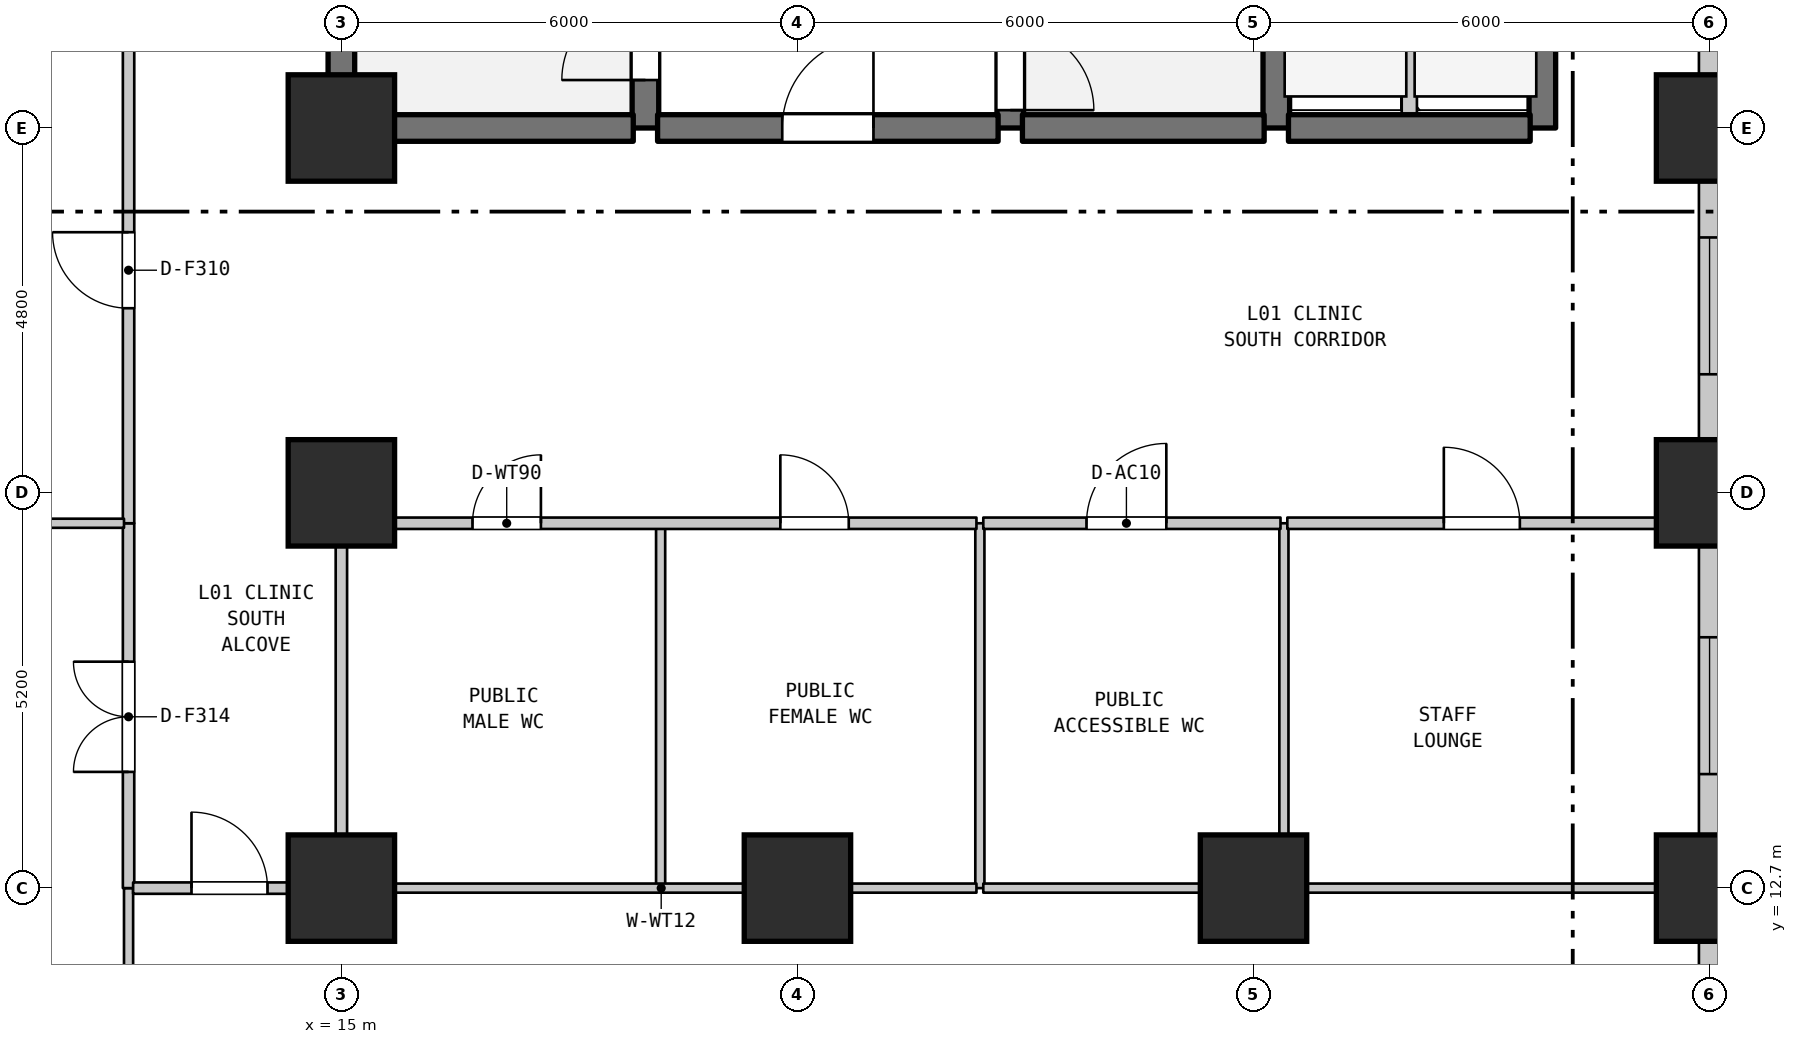
"""IFC4 building model, lengths in metres.
Left out: names, types, materials, properties, quantities, classifications, styles, units other than length and angle.
Written with IfcOpenShell. Run it as: python <this file> out.ifc"""

import sys

from ifc_helpers import new_model, si_unit, direction, frame, frame_2d, origin, origin_2d, place, context, subcontext, project, spatial, rectangle, extrude, element, fill, save


model = new_model("IFC4")
c1 = context("Model", 3, precision=1e-05, world=origin(), true_north=direction((0.0, 1.0)))
c2 = subcontext(c1, "Body", "Model", "MODEL_VIEW")
j1 = project(units=[si_unit("LENGTHUNIT", "METRE"), si_unit("PLANEANGLEUNIT", "RADIAN")], contexts=[c1])
p1 = place(None, origin())
s1 = spatial("IfcSite", under=j1, at=p1, CompositionType="ELEMENT")
p2 = place(p1, origin())
s2 = spatial("IfcBuilding", under=s1, at=p2, CompositionType="ELEMENT")
p3 = place(p2, frame((0.0, 0.0, 6.5)))
s3 = spatial("IfcBuildingStorey", under=s2, at=p3, CompositionType="ELEMENT", Elevation=6.5)
for number, where, z_axis, x_axis in (
    (1, (15.0, 12.7, 0.0), (0.0, 0.0, 1.0), (1.0, 0.0, 0.0)),
    (2, (15.0, 17.9, 0.0), (0.0, 0.0, 1.0), (1.0, 0.0, 0.0)),
    (3, (15.0, 22.7, 0.0), (0.0, 0.0, 1.0), (1.0, 0.0, 0.0)),
    (4, (21.0, 12.7, 0.0), (0.0, 0.0, 1.0), (1.0, 0.0, 0.0)),
    (5, (27.0, 12.7, 0.0), (0.0, 0.0, 1.0), (1.0, 0.0, 0.0)),
):
    element("IfcColumn", number, at=place(p3, frame(where, z_axis=z_axis, x_axis=x_axis)), inside=s3, PredefinedType="COLUMN", context=c2, shape_type="SweptSolid", body=[
        extrude(rectangle(XDim=1.4, YDim=1.4, at=origin_2d()), origin(), (0.0, 0.0, 1.0), 6.5),
    ])
for number, where, z_axis, x_axis in (
    (6, (33.0, 12.7, 0.0), (0.0, 0.0, 1.0), (1.0, 0.0, 0.0)),
    (7, (33.0, 17.9, 0.0), (0.0, 0.0, 1.0), (1.0, 0.0, 0.0)),
    (8, (33.0, 22.7, 0.0), (0.0, 0.0, 1.0), (1.0, 0.0, 0.0)),
):
    element("IfcColumn", number, at=place(p3, frame(where, z_axis=z_axis, x_axis=x_axis)), inside=s3, PredefinedType="PILASTER", context=c2, shape_type="SweptSolid", body=[
        extrude(rectangle(XDim=1.4, YDim=1.4, at=origin_2d()), origin(), (0.0, 0.0, 1.0), 6.5),
    ])
p4 = place(p3, frame((12.2, 0.71, 0.0), z_axis=(0.0, 0.0, 1.0), x_axis=(0.0, 1.0, 0.0)))
e9 = element("IfcWall", 9, at=p4, inside=s3, PredefinedType="PARTITIONING", context=c2, shape_type="SweptSolid", body=[
    extrude(rectangle(XDim=11.99, YDim=0.12, at=frame_2d((5.995, 0.0))), origin(), (0.0, 0.0, 1.0), 6.17),
])
p5 = place(p3, frame((12.2, 12.7, 0.0), z_axis=(0.0, 0.0, 1.0), x_axis=(0.0, 1.0, 0.0)))
e10 = element("IfcWall", 10, at=p5, inside=s3, PredefinedType="STANDARD", context=c2, shape_type="SweptSolid", body=[
    extrude(rectangle(XDim=4.8, YDim=0.15, at=frame_2d((2.4, 0.0))), origin(), (0.0, 0.0, 1.0), 6.17),
])
p6 = place(p5, frame((1.529, 0.0, 0.0)))
e11 = element("IfcOpeningElement", 11, at=p6, cuts=e10, PredefinedType="OPENING", context=c2, shape_type="SweptSolid", body=[
    extrude(rectangle(XDim=1.45, YDim=2.2, at=frame_2d((0.725, 1.1))), frame((0.0, 0.085, 0.0), z_axis=(0.0, -1.0, 0.0), x_axis=(1.0, 0.0, 0.0)), (0.0, 0.0, 1.0), 0.17),
])
p7 = place(p3, frame((12.2, 17.5, 0.0), z_axis=(0.0, 0.0, 1.0), x_axis=(0.0, 1.0, 0.0)))
e12 = element("IfcWall", 12, at=p7, inside=s3, PredefinedType="STANDARD", context=c2, shape_type="SweptSolid", body=[
    extrude(rectangle(XDim=6.7, YDim=0.15, at=frame_2d((3.35, 0.0))), origin(), (0.0, 0.0, 1.0), 6.17),
])
p8 = place(p7, frame((2.829, 0.0, 0.0)))
e13 = element("IfcOpeningElement", 13, at=p8, cuts=e12, PredefinedType="OPENING", context=c2, shape_type="SweptSolid", body=[
    extrude(rectangle(XDim=1.0, YDim=2.15, at=frame_2d((0.5, 1.075))), frame((0.0, 0.085, 0.0), z_axis=(0.0, -1.0, 0.0), x_axis=(1.0, 0.0, 0.0)), (0.0, 0.0, 1.0), 0.17),
])
p9 = place(p3, frame((15.0, 12.7, 0.0), z_axis=(0.0, 0.0, 1.0), x_axis=(0.0, 1.0, 0.0)))
e14 = element("IfcWall", 14, at=p9, inside=s3, PredefinedType="STANDARD", context=c2, shape_type="SweptSolid", body=[
    extrude(rectangle(XDim=4.8, YDim=0.15, at=frame_2d((2.4, 0.0))), origin(), (0.0, 0.0, 1.0), 5.67),
])
p10 = place(p3, frame((15.0, 22.7, 0.0), z_axis=(0.0, 0.0, 1.0), x_axis=(0.0, 1.0, 0.0)))
e15 = element("IfcWall", 15, at=p10, inside=s3, PredefinedType="SHEAR", context=c2, shape_type="SweptSolid", body=[
    extrude(rectangle(XDim=6.8, YDim=0.35, at=frame_2d((3.4, 0.0))), origin(), (0.0, 0.0, 1.0), 6.17),
])
p11 = place(p3, frame((19.0, 22.7, 0.0), z_axis=(0.0, 0.0, 1.0), x_axis=(0.0, 1.0, 0.0)))
e16 = element("IfcWall", 16, at=p11, inside=s3, PredefinedType="SHEAR", context=c2, shape_type="SweptSolid", body=[
    extrude(rectangle(XDim=5.5, YDim=0.35, at=frame_2d((2.75, 0.0))), origin(), (0.0, 0.0, 1.0), 6.17),
])
p12 = place(p11, frame((0.631, 0.0, 0.0)))
e17 = element("IfcOpeningElement", 17, at=p12, cuts=e16, PredefinedType="OPENING", context=c2, shape_type="SweptSolid", body=[
    extrude(rectangle(XDim=1.1, YDim=2.15, at=frame_2d((0.55, 1.075))), frame((0.0, 0.185, 0.0), z_axis=(0.0, -1.0, 0.0), x_axis=(1.0, 0.0, 0.0)), (0.0, 0.0, 1.0), 0.37),
])
for number, where, z_axis, x_axis in (
    (18, (19.2, 12.7, 0.0), (0.0, 0.0, 1.0), (0.0, 1.0, 0.0)),
    (19, (23.4, 12.7, 0.0), (0.0, 0.0, 1.0), (0.0, 1.0, 0.0)),
):
    element("IfcWall", number, at=place(p3, frame(where, z_axis=z_axis, x_axis=x_axis)), inside=s3, PredefinedType="PARTITIONING", context=c2, shape_type="SweptSolid", body=[
        extrude(rectangle(XDim=4.8, YDim=0.12, at=frame_2d((2.4, 0.0))), origin(), (0.0, 0.0, 1.0), 6.17),
    ])
p13 = place(p3, frame((23.8, 22.7, 0.0), z_axis=(0.0, 0.0, 1.0), x_axis=(0.0, 1.0, 0.0)))
e20 = element("IfcWall", 20, at=p13, inside=s3, PredefinedType="SHEAR", context=c2, shape_type="SweptSolid", body=[
    extrude(rectangle(XDim=5.5, YDim=0.35, at=frame_2d((2.75, 0.0))), origin(), (0.0, 0.0, 1.0), 6.17),
])
p14 = place(p13, frame((0.235, 0.0, 0.0)))
e21 = element("IfcOpeningElement", 21, at=p14, cuts=e20, PredefinedType="OPENING", context=c2, shape_type="SweptSolid", body=[
    extrude(rectangle(XDim=1.1, YDim=2.15, at=frame_2d((0.55, 1.075))), frame((0.0, 0.185, 0.0), z_axis=(0.0, -1.0, 0.0), x_axis=(1.0, 0.0, 0.0)), (0.0, 0.0, 1.0), 0.37),
])
p15 = place(p3, frame((27.3, 22.7, 0.0), z_axis=(0.0, 0.0, 1.0), x_axis=(0.0, 1.0, 0.0)))
e22 = element("IfcWall", 22, at=p15, inside=s3, PredefinedType="SHEAR", context=c2, shape_type="SweptSolid", body=[
    extrude(rectangle(XDim=2.9, YDim=0.35, at=frame_2d((1.45, 0.0))), origin(), (0.0, 0.0, 1.0), 6.17),
])
p16 = place(p3, frame((27.4, 12.7, 0.0), z_axis=(0.0, 0.0, 1.0), x_axis=(0.0, 1.0, 0.0)))
e23 = element("IfcWall", 23, at=p16, inside=s3, PredefinedType="PARTITIONING", context=c2, shape_type="SweptSolid", body=[
    extrude(rectangle(XDim=4.8, YDim=0.12, at=frame_2d((2.4, 0.0))), origin(), (0.0, 0.0, 1.0), 6.17),
])
p17 = place(p3, frame((29.05, 22.7, 0.0), z_axis=(0.0, 0.0, 1.0), x_axis=(0.0, 1.0, 0.0)))
e24 = element("IfcWall", 24, at=p17, inside=s3, PredefinedType="STANDARD", context=c2, shape_type="SweptSolid", body=[
    extrude(rectangle(XDim=2.9, YDim=0.2, at=frame_2d((1.45, 0.0))), origin(), (0.0, 0.0, 1.0), 6.17),
])
p18 = place(p3, frame((30.8, 22.7, 0.0), z_axis=(0.0, 0.0, 1.0), x_axis=(0.0, 1.0, 0.0)))
e25 = element("IfcWall", 25, at=p18, inside=s3, PredefinedType="SHEAR", context=c2, shape_type="SweptSolid", body=[
    extrude(rectangle(XDim=2.9, YDim=0.35, at=frame_2d((1.45, 0.0))), origin(), (0.0, 0.0, 1.0), 6.17),
])
p19 = place(p3, frame((12.26, 12.7, 0.0), z_axis=(0.0, 0.0, 1.0), x_axis=(1.0, 0.0, 0.0)))
e26 = element("IfcWall", 26, at=p19, inside=s3, PredefinedType="STANDARD", context=c2, shape_type="SweptSolid", body=[
    extrude(rectangle(XDim=2.68, YDim=0.15, at=frame_2d((1.34, 0.0))), origin(), (0.0, 0.0, 1.0), 6.17),
])
p20 = place(p19, frame((0.768, 0.0, 0.0)))
e27 = element("IfcOpeningElement", 27, at=p20, cuts=e26, PredefinedType="OPENING", context=c2, shape_type="SweptSolid", body=[
    extrude(rectangle(XDim=1.0, YDim=2.15, at=frame_2d((0.5, 1.075))), frame((0.0, 0.085, 0.0), z_axis=(0.0, -1.0, 0.0), x_axis=(1.0, 0.0, 0.0)), (0.0, 0.0, 1.0), 0.17),
])
p21 = place(p3, frame((15.06, 12.7, 0.0), z_axis=(0.0, 0.0, 1.0), x_axis=(1.0, 0.0, 0.0)))
e28 = element("IfcWall", 28, at=p21, inside=s3, PredefinedType="PARTITIONING", context=c2, shape_type="SweptSolid", body=[
    extrude(rectangle(XDim=8.295, YDim=0.12, at=frame_2d((4.147, 0.0))), origin(), (0.0, 0.0, 1.0), 6.17),
])
p22 = place(p3, frame((23.445, 12.7, 0.0), z_axis=(0.0, 0.0, 1.0), x_axis=(1.0, 0.0, 0.0)))
e29 = element("IfcWall", 29, at=p22, inside=s3, PredefinedType="PARTITIONING", context=c2, shape_type="SweptSolid", body=[
    extrude(rectangle(XDim=3.91, YDim=0.12, at=frame_2d((1.955, 0.0))), origin(), (0.0, 0.0, 1.0), 6.17),
])
p23 = place(p3, frame((27.445, 12.7, 0.0), z_axis=(0.0, 0.0, 1.0), x_axis=(1.0, 0.0, 0.0)))
e30 = element("IfcWall", 30, at=p23, inside=s3, PredefinedType="PARTITIONING", context=c2, shape_type="SweptSolid", body=[
    extrude(rectangle(XDim=5.545, YDim=0.12, at=frame_2d((2.772, 0.0))), origin(), (0.0, 0.0, 1.0), 6.17),
])
p24 = place(p3, frame((3.69, 17.5, 0.0), z_axis=(0.0, 0.0, 1.0), x_axis=(1.0, 0.0, 0.0)))
e31 = element("IfcWall", 31, at=p24, inside=s3, PredefinedType="PARTITIONING", context=c2, shape_type="SweptSolid", body=[
    extrude(rectangle(XDim=8.45, YDim=0.12, at=frame_2d((4.225, 0.0))), origin(), (0.0, 0.0, 1.0), 6.17),
])
p25 = place(p3, frame((15.06, 17.5, 0.0), z_axis=(0.0, 0.0, 1.0), x_axis=(1.0, 0.0, 0.0)))
e32 = element("IfcWall", 32, at=p25, inside=s3, PredefinedType="STANDARD", context=c2, shape_type="SweptSolid", body=[
    extrude(rectangle(XDim=8.295, YDim=0.15, at=frame_2d((4.147, 0.0))), origin(), (0.0, 0.0, 1.0), 6.17),
])
p26 = place(p25, frame((1.665, 0.0, 0.0)))
e33 = element("IfcOpeningElement", 33, at=p26, cuts=e32, PredefinedType="OPENING", context=c2, shape_type="SweptSolid", body=[
    extrude(rectangle(XDim=0.9, YDim=2.1, at=frame_2d((0.45, 1.05))), frame((0.0, 0.085, 0.0), z_axis=(0.0, -1.0, 0.0), x_axis=(1.0, 0.0, 0.0)), (0.0, 0.0, 1.0), 0.17),
])
p27 = place(p25, frame((5.715, 0.0, 0.0)))
e34 = element("IfcOpeningElement", 34, at=p27, cuts=e32, PredefinedType="OPENING", context=c2, shape_type="SweptSolid", body=[
    extrude(rectangle(XDim=0.9, YDim=2.1, at=frame_2d((0.45, 1.05))), frame((0.0, 0.085, 0.0), z_axis=(0.0, -1.0, 0.0), x_axis=(1.0, 0.0, 0.0)), (0.0, 0.0, 1.0), 0.17),
])
p28 = place(p3, frame((23.445, 17.5, 0.0), z_axis=(0.0, 0.0, 1.0), x_axis=(1.0, 0.0, 0.0)))
e35 = element("IfcWall", 35, at=p28, inside=s3, PredefinedType="STANDARD", context=c2, shape_type="SweptSolid", body=[
    extrude(rectangle(XDim=3.91, YDim=0.15, at=frame_2d((1.955, 0.0))), origin(), (0.0, 0.0, 1.0), 6.17),
])
p29 = place(p28, frame((1.358, 0.0, 0.0)))
e36 = element("IfcOpeningElement", 36, at=p29, cuts=e35, PredefinedType="OPENING", context=c2, shape_type="SweptSolid", body=[
    extrude(rectangle(XDim=1.05, YDim=2.15, at=frame_2d((0.525, 1.075))), frame((0.0, 0.085, 0.0), z_axis=(0.0, -1.0, 0.0), x_axis=(1.0, 0.0, 0.0)), (0.0, 0.0, 1.0), 0.17),
])
p30 = place(p3, frame((27.445, 17.5, 0.0), z_axis=(0.0, 0.0, 1.0), x_axis=(1.0, 0.0, 0.0)))
e37 = element("IfcWall", 37, at=p30, inside=s3, PredefinedType="STANDARD", context=c2, shape_type="SweptSolid", body=[
    extrude(rectangle(XDim=5.545, YDim=0.15, at=frame_2d((2.772, 0.0))), origin(), (0.0, 0.0, 1.0), 6.17),
])
p31 = place(p30, frame((2.059, 0.0, 0.0)))
e38 = element("IfcOpeningElement", 38, at=p31, cuts=e37, PredefinedType="OPENING", context=c2, shape_type="SweptSolid", body=[
    extrude(rectangle(XDim=1.0, YDim=2.15, at=frame_2d((0.5, 1.075))), frame((0.0, 0.085, 0.0), z_axis=(0.0, -1.0, 0.0), x_axis=(1.0, 0.0, 0.0)), (0.0, 0.0, 1.0), 0.17),
])
p32 = place(p3, frame((15.16, 22.7, 0.0), z_axis=(0.0, 0.0, 1.0), x_axis=(1.0, 0.0, 0.0)))
e39 = element("IfcWall", 39, at=p32, inside=s3, PredefinedType="SHEAR", context=c2, shape_type="SweptSolid", body=[
    extrude(rectangle(XDim=3.68, YDim=0.35, at=frame_2d((1.84, 0.0))), origin(), (0.0, 0.0, 1.0), 6.17),
])
p33 = place(p3, frame((19.16, 22.7, 0.0), z_axis=(0.0, 0.0, 1.0), x_axis=(1.0, 0.0, 0.0)))
e40 = element("IfcWall", 40, at=p33, inside=s3, PredefinedType="SHEAR", context=c2, shape_type="SweptSolid", body=[
    extrude(rectangle(XDim=4.48, YDim=0.35, at=frame_2d((2.24, 0.0))), origin(), (0.0, 0.0, 1.0), 6.17),
])
p34 = place(p33, frame((1.64, 0.0, 0.0)))
e41 = element("IfcOpeningElement", 41, at=p34, cuts=e40, PredefinedType="OPENING", context=c2, shape_type="SweptSolid", body=[
    extrude(rectangle(XDim=1.2, YDim=2.2, at=frame_2d((0.6, 1.1))), frame((0.0, 0.185, 0.0), z_axis=(0.0, -1.0, 0.0), x_axis=(1.0, 0.0, 0.0)), (0.0, 0.0, 1.0), 0.37),
])
for number, where, z_axis, x_axis in (
    (42, (23.96, 22.7, 0.0), (0.0, 0.0, 1.0), (1.0, 0.0, 0.0)),
    (43, (27.46, 22.7, 0.0), (0.0, 0.0, 1.0), (1.0, 0.0, 0.0)),
):
    element("IfcWall", number, at=place(p3, frame(where, z_axis=z_axis, x_axis=x_axis)), inside=s3, PredefinedType="SHEAR", context=c2, shape_type="SweptSolid", body=[
        extrude(rectangle(XDim=3.18, YDim=0.35, at=frame_2d((1.59, 0.0))), origin(), (0.0, 0.0, 1.0), 6.17),
    ])
p35 = place(p3, frame((33.0, 27.9, 0.0), z_axis=(0.0, 0.0, 1.0), x_axis=(0.0, -1.0, 0.0)))
e44 = element("IfcWall", 44, at=p35, inside=s3, PredefinedType="STANDARD", context=c2, shape_type="SweptSolid", body=[
    extrude(rectangle(XDim=27.2, YDim=0.28, at=frame_2d((13.6, 0.0))), origin(), (0.0, 0.0, 1.0), 5.67),
])
p36 = place(p35, frame((1.78, 0.0, 0.95)))
e45 = element("IfcOpeningElement", 45, at=p36, cuts=e44, PredefinedType="OPENING", context=c2, shape_type="SweptSolid", body=[
    extrude(rectangle(XDim=1.8, YDim=1.8, at=frame_2d((0.9, 0.9))), frame((0.0, 0.15, 0.0), z_axis=(0.0, -1.0, 0.0), x_axis=(1.0, 0.0, 0.0)), (0.0, 0.0, 1.0), 0.3),
])
p37 = place(p35, frame((6.64, 0.0, 0.95)))
e46 = element("IfcOpeningElement", 46, at=p37, cuts=e44, PredefinedType="OPENING", context=c2, shape_type="SweptSolid", body=[
    extrude(rectangle(XDim=1.8, YDim=1.8, at=frame_2d((0.9, 0.9))), frame((0.0, 0.15, 0.0), z_axis=(0.0, -1.0, 0.0), x_axis=(1.0, 0.0, 0.0)), (0.0, 0.0, 1.0), 0.3),
])
p38 = place(p35, frame((11.9, 0.0, 0.95)))
e47 = element("IfcOpeningElement", 47, at=p38, cuts=e44, PredefinedType="OPENING", context=c2, shape_type="SweptSolid", body=[
    extrude(rectangle(XDim=1.8, YDim=1.8, at=frame_2d((0.9, 0.9))), frame((0.0, 0.15, 0.0), z_axis=(0.0, -1.0, 0.0), x_axis=(1.0, 0.0, 0.0)), (0.0, 0.0, 1.0), 0.3),
])
p39 = place(p35, frame((18.01, 0.0, 0.95)))
e48 = element("IfcOpeningElement", 48, at=p39, cuts=e44, PredefinedType="OPENING", context=c2, shape_type="SweptSolid", body=[
    extrude(rectangle(XDim=1.8, YDim=1.8, at=frame_2d((0.9, 0.9))), frame((0.0, 0.15, 0.0), z_axis=(0.0, -1.0, 0.0), x_axis=(1.0, 0.0, 0.0)), (0.0, 0.0, 1.0), 0.3),
])
p40 = place(p35, frame((23.27, 0.0, 0.95)))
e49 = element("IfcOpeningElement", 49, at=p40, cuts=e44, PredefinedType="OPENING", context=c2, shape_type="SweptSolid", body=[
    extrude(rectangle(XDim=1.8, YDim=1.8, at=frame_2d((0.9, 0.9))), frame((0.0, 0.15, 0.0), z_axis=(0.0, -1.0, 0.0), x_axis=(1.0, 0.0, 0.0)), (0.0, 0.0, 1.0), 0.3),
])
p41 = place(p37, origin())
e50 = element("IfcWindow", 50, at=p41, inside=s3, PartitioningType="DOUBLE_PANEL_VERTICAL", PredefinedType="WINDOW", context=c2, shape_type="SweptSolid", body=[
    extrude(rectangle(XDim=1.8, YDim=1.8, at=frame_2d((0.9, 0.9))), frame((0.0, 0.03, 0.0), z_axis=(0.0, -1.0, 0.0), x_axis=(1.0, 0.0, 0.0)), (0.0, 0.0, 1.0), 0.06),
])
fill(e46, e50)
p42 = place(p38, origin())
e51 = element("IfcWindow", 51, at=p42, inside=s3, PartitioningType="DOUBLE_PANEL_VERTICAL", PredefinedType="WINDOW", context=c2, shape_type="SweptSolid", body=[
    extrude(rectangle(XDim=1.8, YDim=1.8, at=frame_2d((0.9, 0.9))), frame((0.0, 0.03, 0.0), z_axis=(0.0, -1.0, 0.0), x_axis=(1.0, 0.0, 0.0)), (0.0, 0.0, 1.0), 0.06),
])
fill(e47, e51)
p43 = place(p6, origin())
e52 = element("IfcDoor", 52, at=p43, inside=s3, OperationType="DOUBLE_DOOR_SINGLE_SWING", PredefinedType="DOOR", context=c2, shape_type="SweptSolid", body=[
    extrude(rectangle(XDim=1.45, YDim=2.2, at=frame_2d((0.725, 1.1))), frame((0.0, 0.025, 0.0), z_axis=(0.0, -1.0, 0.0), x_axis=(1.0, 0.0, 0.0)), (0.0, 0.0, 1.0), 0.05),
])
fill(e11, e52)
p44 = place(p8, origin())
e53 = element("IfcDoor", 53, at=p44, inside=s3, OperationType="SINGLE_SWING_RIGHT", PredefinedType="DOOR", context=c2, shape_type="SweptSolid", body=[
    extrude(rectangle(XDim=1.0, YDim=2.15, at=frame_2d((0.5, 1.075))), frame((0.0, 0.025, 0.0), z_axis=(0.0, -1.0, 0.0), x_axis=(1.0, 0.0, 0.0)), (0.0, 0.0, 1.0), 0.05),
])
fill(e13, e53)
p45 = place(p12, origin())
e54 = element("IfcDoor", 54, at=p45, inside=s3, OperationType="SINGLE_SWING_LEFT", PredefinedType="DOOR", context=c2, shape_type="SweptSolid", body=[
    extrude(rectangle(XDim=1.1, YDim=2.15, at=frame_2d((0.55, 1.075))), frame((0.0, 0.025, 0.0), z_axis=(0.0, -1.0, 0.0), x_axis=(1.0, 0.0, 0.0)), (0.0, 0.0, 1.0), 0.05),
])
fill(e17, e54)
p46 = place(p14, frame((1.1, 0.0, 0.0), z_axis=(0.0, 0.0, 1.0), x_axis=(-1.0, 0.0, 0.0)))
e55 = element("IfcDoor", 55, at=p46, inside=s3, OperationType="SINGLE_SWING_LEFT", PredefinedType="DOOR", context=c2, shape_type="SweptSolid", body=[
    extrude(rectangle(XDim=1.1, YDim=2.15, at=frame_2d((0.55, 1.075))), frame((0.0, 0.025, 0.0), z_axis=(0.0, -1.0, 0.0), x_axis=(1.0, 0.0, 0.0)), (0.0, 0.0, 1.0), 0.05),
])
fill(e21, e55)
p47 = place(p20, origin())
e56 = element("IfcDoor", 56, at=p47, inside=s3, OperationType="SINGLE_SWING_LEFT", PredefinedType="DOOR", context=c2, shape_type="SweptSolid", body=[
    extrude(rectangle(XDim=1.0, YDim=2.15, at=frame_2d((0.5, 1.075))), frame((0.0, 0.025, 0.0), z_axis=(0.0, -1.0, 0.0), x_axis=(1.0, 0.0, 0.0)), (0.0, 0.0, 1.0), 0.05),
])
fill(e27, e56)
p48 = place(p26, origin())
e57 = element("IfcDoor", 57, at=p48, inside=s3, OperationType="SINGLE_SWING_RIGHT", PredefinedType="DOOR", context=c2, shape_type="SweptSolid", body=[
    extrude(rectangle(XDim=0.9, YDim=2.1, at=frame_2d((0.45, 1.05))), frame((0.0, 0.025, 0.0), z_axis=(0.0, -1.0, 0.0), x_axis=(1.0, 0.0, 0.0)), (0.0, 0.0, 1.0), 0.05),
])
fill(e33, e57)
p49 = place(p27, origin())
e58 = element("IfcDoor", 58, at=p49, inside=s3, OperationType="SINGLE_SWING_LEFT", PredefinedType="DOOR", context=c2, shape_type="SweptSolid", body=[
    extrude(rectangle(XDim=0.9, YDim=2.1, at=frame_2d((0.45, 1.05))), frame((0.0, 0.025, 0.0), z_axis=(0.0, -1.0, 0.0), x_axis=(1.0, 0.0, 0.0)), (0.0, 0.0, 1.0), 0.05),
])
fill(e34, e58)
p50 = place(p29, origin())
e59 = element("IfcDoor", 59, at=p50, inside=s3, OperationType="SINGLE_SWING_RIGHT", PredefinedType="DOOR", context=c2, shape_type="SweptSolid", body=[
    extrude(rectangle(XDim=1.05, YDim=2.15, at=frame_2d((0.525, 1.075))), frame((0.0, 0.025, 0.0), z_axis=(0.0, -1.0, 0.0), x_axis=(1.0, 0.0, 0.0)), (0.0, 0.0, 1.0), 0.05),
])
fill(e36, e59)
p51 = place(p31, origin())
e60 = element("IfcDoor", 60, at=p51, inside=s3, OperationType="SINGLE_SWING_LEFT", PredefinedType="DOOR", context=c2, shape_type="SweptSolid", body=[
    extrude(rectangle(XDim=1.0, YDim=2.15, at=frame_2d((0.5, 1.075))), frame((0.0, 0.025, 0.0), z_axis=(0.0, -1.0, 0.0), x_axis=(1.0, 0.0, 0.0)), (0.0, 0.0, 1.0), 0.05),
])
fill(e38, e60)
p52 = place(p34, origin())
e61 = element("IfcDoor", 61, at=p52, inside=s3, OperationType="SINGLE_SWING_RIGHT", PredefinedType="DOOR", context=c2, shape_type="SweptSolid", body=[
    extrude(rectangle(XDim=1.2, YDim=2.2, at=frame_2d((0.6, 1.1))), frame((0.0, 0.025, 0.0), z_axis=(0.0, -1.0, 0.0), x_axis=(1.0, 0.0, 0.0)), (0.0, 0.0, 1.0), 0.05),
])
fill(e41, e61)
save(model, sys.argv[1])
